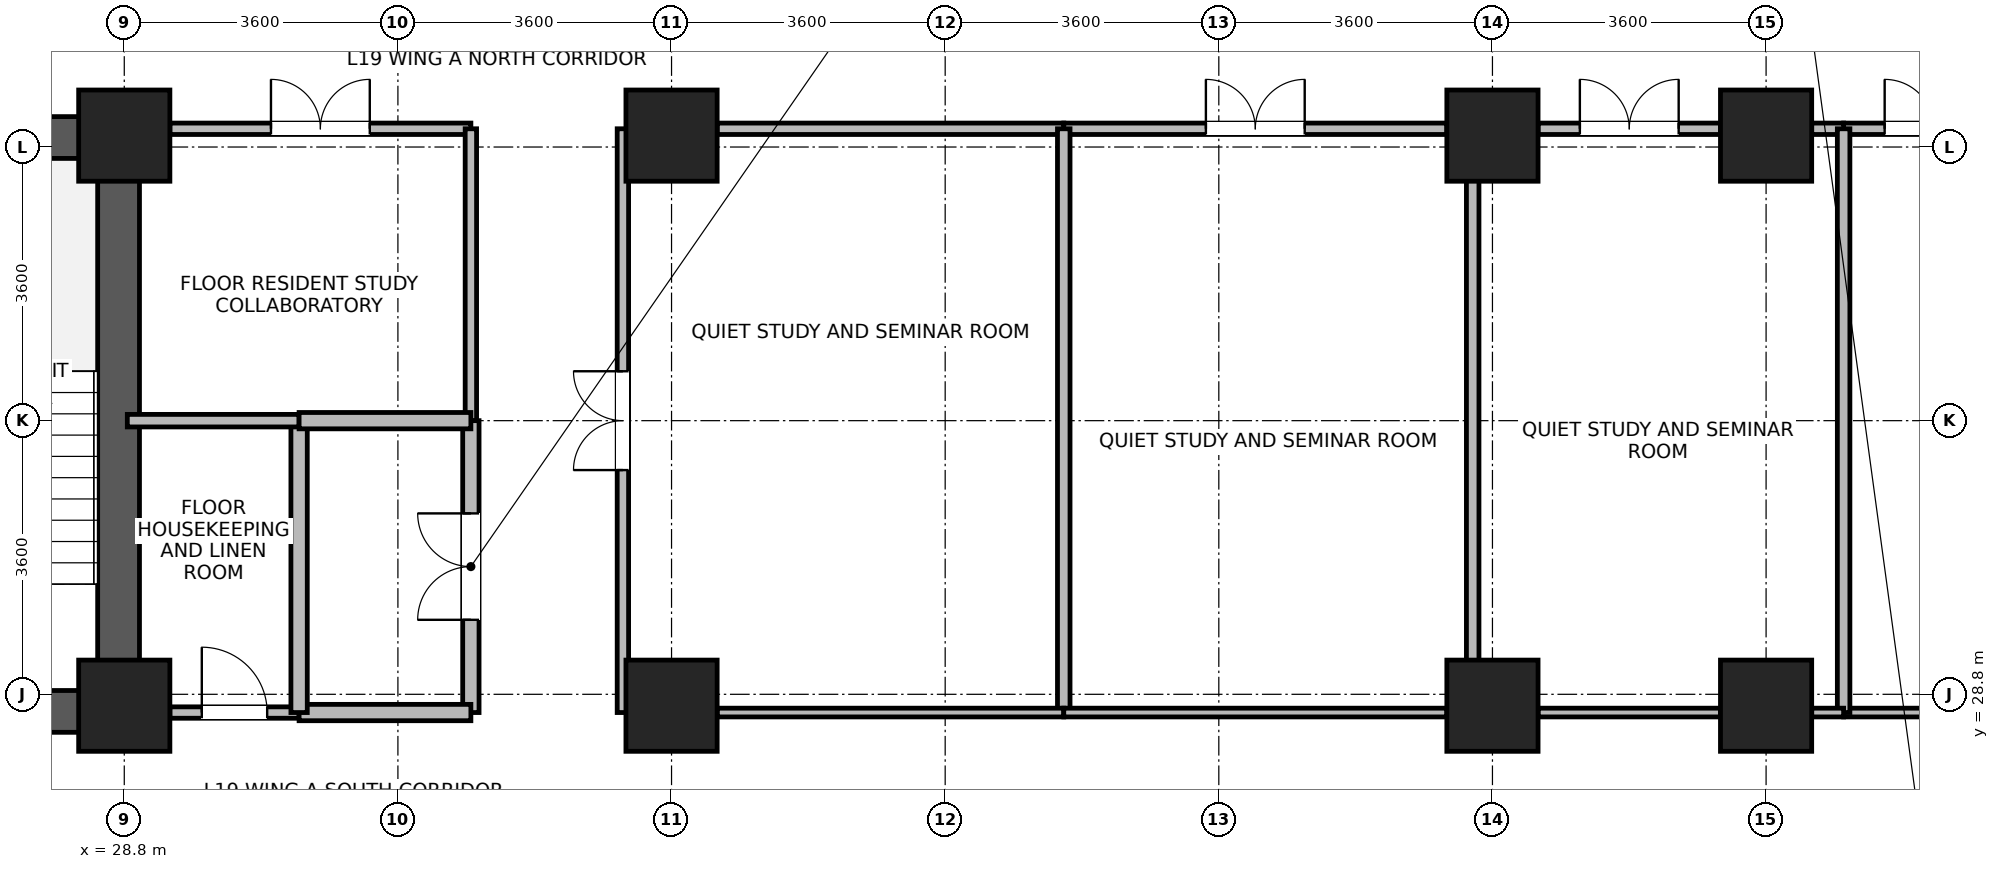
"""IFC4 building model, lengths in metres.
Left out: names, types, materials, properties, quantities, classifications, styles, units other than length and angle.
Written with IfcOpenShell. Run it as: python <this file> out.ifc"""

import sys

from ifc_helpers import new_model, si_unit, direction, frame, frame_2d, origin, origin_2d, place, context, subcontext, project, spatial, rectangle, extrude, source, transform, mapped, element, fill, save


model = new_model("IFC4")
c1 = context("Model", 3, precision=1e-05, world=origin(), true_north=direction((0.0, 1.0)))
c2 = subcontext(c1, "Body", "Model", "MODEL_VIEW")
j1 = project(units=[si_unit("LENGTHUNIT", "METRE"), si_unit("PLANEANGLEUNIT", "RADIAN")], contexts=[c1])
p1 = place(None, origin())
s1 = spatial("IfcSite", under=j1, at=p1, CompositionType="ELEMENT")
p2 = place(p1, origin())
s2 = spatial("IfcBuilding", under=s1, at=p2, CompositionType="ELEMENT")
p3 = place(p2, frame((0.0, 0.0, 78.6)))
s3 = spatial("IfcBuildingStorey", under=s2, at=p3, CompositionType="ELEMENT", Elevation=78.6)
p4 = place(p3, frame((28.725, 28.3, 0.0), z_axis=(0.0, 0.0, 1.0), x_axis=(0.0, 1.0, 0.0)))
e1 = element("IfcWall", 1, at=p4, inside=s3, PredefinedType="SHEAR", context=c2, shape_type="SweptSolid", body=[
    extrude(rectangle(XDim=8.1, YDim=0.55, at=frame_2d((4.05, 0.0))), origin(), (0.0, 0.0, 1.0), 3.45),
])
for number, where, z_axis, x_axis in (
    (2, (25.25, 28.575, 0.0), (0.0, 0.0, 1.0), (1.0, 0.0, 0.0)),
    (3, (25.25, 36.125, 0.0), (0.0, 0.0, 1.0), (1.0, 0.0, 0.0)),
):
    element("IfcWall", number, at=place(p3, frame(where, z_axis=z_axis, x_axis=x_axis)), inside=s3, PredefinedType="SHEAR", context=c2, shape_type="SweptSolid", body=[
        extrude(rectangle(XDim=3.2, YDim=0.55, at=frame_2d((1.6, 0.0))), origin(), (0.0, 0.0, 1.0), 3.45),
    ])
m1 = source(origin(), c2, "Body", "SweptSolid", [
    extrude(rectangle(XDim=1.2, YDim=1.2, at=origin_2d()), origin(), (0.0, 0.0, 1.0), 3.7),
])
for number, where, z_axis, x_axis in (
    (4, (28.8, 28.65, 0.0), (0.0, 0.0, 1.0), (1.0, 0.0, 0.0)),
    (5, (28.8, 36.15, 0.0), (0.0, 0.0, 1.0), (1.0, 0.0, 0.0)),
    (6, (36.0, 28.65, 0.0), (0.0, 0.0, 1.0), (1.0, 0.0, 0.0)),
    (7, (36.0, 36.15, 0.0), (0.0, 0.0, 1.0), (1.0, 0.0, 0.0)),
    (8, (46.8, 28.65, 0.0), (0.0, 0.0, 1.0), (1.0, 0.0, 0.0)),
    (9, (46.8, 36.15, 0.0), (0.0, 0.0, 1.0), (1.0, 0.0, 0.0)),
    (10, (50.4, 28.65, 0.0), (0.0, 0.0, 1.0), (1.0, 0.0, 0.0)),
    (11, (50.4, 36.15, 0.0), (0.0, 0.0, 1.0), (1.0, 0.0, 0.0)),
):
    element("IfcColumn", number, at=place(p3, frame(where, z_axis=z_axis, x_axis=x_axis)), inside=s3, PredefinedType="COLUMN", context=c2, shape_type="MappedRepresentation", body=[
        mapped(m1, transform((0.0, 0.0, 0.0), x_axis=(1.0, 0.0, 0.0), y_axis=(0.0, 1.0, 0.0), z_axis=(0.0, 0.0, 1.0), scale=1.0)),
    ])
p5 = place(p3, frame((51.42, 36.24, 0.0), z_axis=(0.0, 0.0, 1.0), x_axis=(1.0, 0.0, 0.0)))
e12 = element("IfcWall", 12, at=p5, inside=s3, PredefinedType="PARTITIONING", context=c2, shape_type="SweptSolid", body=[
    extrude(rectangle(XDim=2.38, YDim=0.15, at=frame_2d((1.19, 0.0))), origin(), (0.0, 0.0, 1.0), 2.78),
])
p6 = place(p5, frame((0.54, 0.0, 0.0)))
e13 = element("IfcOpeningElement", 13, at=p6, cuts=e12, PredefinedType="OPENING", context=c2, shape_type="SweptSolid", body=[
    extrude(rectangle(XDim=1.3, YDim=2.12, at=frame_2d((0.65, 1.06))), frame((0.0, 0.085, 0.0), z_axis=(0.0, -1.0, 0.0), x_axis=(1.0, 0.0, 0.0)), (0.0, 0.0, 1.0), 0.17),
])
p7 = place(p3, frame((35.36, 28.56, 0.0), z_axis=(0.0, 0.0, 1.0), x_axis=(0.0, 1.0, 0.0)))
e14 = element("IfcWall", 14, at=p7, inside=s3, PredefinedType="PARTITIONING", context=c2, shape_type="SweptSolid", body=[
    extrude(rectangle(XDim=7.68, YDim=0.15, at=frame_2d((3.84, 0.0))), origin(), (0.0, 0.0, 1.0), 3.43),
])
p8 = place(p7, frame((3.19, 0.0, 0.0)))
e15 = element("IfcOpeningElement", 15, at=p8, cuts=e14, PredefinedType="OPENING", context=c2, shape_type="SweptSolid", body=[
    extrude(rectangle(XDim=1.3, YDim=2.12, at=frame_2d((0.65, 1.06))), frame((0.0, 0.085, 0.0), z_axis=(0.0, -1.0, 0.0), x_axis=(1.0, 0.0, 0.0)), (0.0, 0.0, 1.0), 0.17),
])
p9 = place(p3, frame((36.6, 36.24, 0.0), z_axis=(0.0, 0.0, 1.0), x_axis=(1.0, 0.0, 0.0)))
e16 = element("IfcWall", 16, at=p9, inside=s3, PredefinedType="PARTITIONING", context=c2, shape_type="SweptSolid", body=[
    extrude(rectangle(XDim=4.56, YDim=0.15, at=frame_2d((2.28, 0.0))), origin(), (0.0, 0.0, 1.0), 2.78),
])
p10 = place(p3, frame((41.16, 36.24, 0.0), z_axis=(0.0, 0.0, 1.0), x_axis=(1.0, 0.0, 0.0)))
e17 = element("IfcWall", 17, at=p10, inside=s3, PredefinedType="PARTITIONING", context=c2, shape_type="SweptSolid", body=[
    extrude(rectangle(XDim=5.04, YDim=0.15, at=frame_2d((2.52, 0.0))), origin(), (0.0, 0.0, 1.0), 2.78),
])
p11 = place(p10, frame((1.87, 0.0, 0.0)))
e18 = element("IfcOpeningElement", 18, at=p11, cuts=e17, PredefinedType="OPENING", context=c2, shape_type="SweptSolid", body=[
    extrude(rectangle(XDim=1.3, YDim=2.12, at=frame_2d((0.65, 1.06))), frame((0.0, 0.085, 0.0), z_axis=(0.0, -1.0, 0.0), x_axis=(1.0, 0.0, 0.0)), (0.0, 0.0, 1.0), 0.17),
])
p12 = place(p3, frame((47.4, 36.24, 0.0), z_axis=(0.0, 0.0, 1.0), x_axis=(1.0, 0.0, 0.0)))
e19 = element("IfcWall", 19, at=p12, inside=s3, PredefinedType="PARTITIONING", context=c2, shape_type="SweptSolid", body=[
    extrude(rectangle(XDim=2.4, YDim=0.15, at=frame_2d((1.2, 0.0))), origin(), (0.0, 0.0, 1.0), 2.78),
])
p13 = place(p12, frame((0.55, 0.0, 0.0)))
e20 = element("IfcOpeningElement", 20, at=p13, cuts=e19, PredefinedType="OPENING", context=c2, shape_type="SweptSolid", body=[
    extrude(rectangle(XDim=1.3, YDim=2.12, at=frame_2d((0.65, 1.06))), frame((0.0, 0.085, 0.0), z_axis=(0.0, -1.0, 0.0), x_axis=(1.0, 0.0, 0.0)), (0.0, 0.0, 1.0), 0.17),
])
p14 = place(p3, frame((51.0, 36.24, 0.0), z_axis=(0.0, 0.0, 1.0), x_axis=(1.0, 0.0, 0.0)))
e21 = element("IfcWall", 21, at=p14, inside=s3, PredefinedType="PARTITIONING", context=c2, shape_type="SweptSolid", body=[
    extrude(rectangle(XDim=0.42, YDim=0.15, at=frame_2d((0.21, 0.0))), origin(), (0.0, 0.0, 1.0), 2.78),
])
p15 = place(p3, frame((29.4, 36.24, 0.0), z_axis=(0.0, 0.0, 1.0), x_axis=(1.0, 0.0, 0.0)))
e22 = element("IfcWall", 22, at=p15, inside=s3, PredefinedType="PARTITIONING", context=c2, shape_type="SweptSolid", body=[
    extrude(rectangle(XDim=3.96, YDim=0.15, at=frame_2d((1.98, 0.0))), origin(), (0.0, 0.0, 1.0), 2.78),
])
p16 = place(p15, frame((1.33, 0.0, 0.0)))
e23 = element("IfcOpeningElement", 23, at=p16, cuts=e22, PredefinedType="OPENING", context=c2, shape_type="SweptSolid", body=[
    extrude(rectangle(XDim=1.3, YDim=2.12, at=frame_2d((0.65, 1.06))), frame((0.0, 0.085, 0.0), z_axis=(0.0, -1.0, 0.0), x_axis=(1.0, 0.0, 0.0)), (0.0, 0.0, 1.0), 0.17),
])
p17 = place(p3, frame((33.36, 32.4, 0.0), z_axis=(0.0, 0.0, 1.0), x_axis=(0.0, 1.0, 0.0)))
e24 = element("IfcWall", 24, at=p17, inside=s3, PredefinedType="PARTITIONING", context=c2, shape_type="SweptSolid", body=[
    extrude(rectangle(XDim=3.84, YDim=0.15, at=frame_2d((1.92, 0.0))), origin(), (0.0, 0.0, 1.0), 3.43),
])
p18 = place(p3, frame((33.36, 28.56, 0.0), z_axis=(0.0, 0.0, 1.0), x_axis=(0.0, 1.0, 0.0)))
e25 = element("IfcWall", 25, at=p18, inside=s3, PredefinedType="PARTITIONING", context=c2, shape_type="SweptSolid", body=[
    extrude(rectangle(XDim=3.84, YDim=0.215, at=frame_2d((1.92, 0.0))), origin(), (0.0, 0.0, 1.0), 3.43),
])
p19 = place(p18, frame((1.22, 0.0, 0.0)))
e26 = element("IfcOpeningElement", 26, at=p19, cuts=e25, PredefinedType="OPENING", context=c2, shape_type="SweptSolid", body=[
    extrude(rectangle(XDim=1.4, YDim=2.15, at=frame_2d((0.7, 1.075))), frame((0.0, 0.118, 0.0), z_axis=(0.0, -1.0, 0.0), x_axis=(1.0, 0.0, 0.0)), (0.0, 0.0, 1.0), 0.235),
])
p20 = place(p3, frame((29.4, 28.56, 0.0), z_axis=(0.0, 0.0, 1.0), x_axis=(1.0, 0.0, 0.0)))
e27 = element("IfcWall", 27, at=p20, inside=s3, PredefinedType="PARTITIONING", context=c2, shape_type="SweptSolid", body=[
    extrude(rectangle(XDim=1.7, YDim=0.15, at=frame_2d((0.85, 0.0))), origin(), (0.0, 0.0, 1.0), 2.78),
])
p21 = place(p20, frame((0.42, 0.0, 0.0)))
e28 = element("IfcOpeningElement", 28, at=p21, cuts=e27, PredefinedType="OPENING", context=c2, shape_type="SweptSolid", body=[
    extrude(rectangle(XDim=0.86, YDim=2.02, at=frame_2d((0.43, 1.01))), frame((0.0, 0.085, 0.0), z_axis=(0.0, -1.0, 0.0), x_axis=(1.0, 0.0, 0.0)), (0.0, 0.0, 1.0), 0.17),
])
p22 = place(p3, frame((31.1, 28.56, 0.0), z_axis=(0.0, 0.0, 1.0), x_axis=(1.0, 0.0, 0.0)))
e29 = element("IfcWall", 29, at=p22, inside=s3, PredefinedType="PARTITIONING", context=c2, shape_type="SweptSolid", body=[
    extrude(rectangle(XDim=2.26, YDim=0.215, at=frame_2d((1.13, 0.0))), origin(), (0.0, 0.0, 1.0), 2.78),
])
p23 = place(p3, frame((51.42, 28.56, 0.0), z_axis=(0.0, 0.0, 1.0), x_axis=(1.0, 0.0, 0.0)))
e30 = element("IfcWall", 30, at=p23, inside=s3, PredefinedType="PARTITIONING", context=c2, shape_type="SweptSolid", body=[
    extrude(rectangle(XDim=2.38, YDim=0.115, at=frame_2d((1.19, 0.0))), origin(), (0.0, 0.0, 1.0), 2.78),
])
for number, where, z_axis, x_axis in (
    (31, (41.16, 28.56, 0.0), (0.0, 0.0, 1.0), (0.0, 1.0, 0.0)),
    (32, (46.54, 28.56, 0.0), (0.0, 0.0, 1.0), (0.0, 1.0, 0.0)),
    (33, (51.42, 28.56, 0.0), (0.0, 0.0, 1.0), (0.0, 1.0, 0.0)),
):
    element("IfcWall", number, at=place(p3, frame(where, z_axis=z_axis, x_axis=x_axis)), inside=s3, PredefinedType="PARTITIONING", context=c2, shape_type="SweptSolid", body=[
        extrude(rectangle(XDim=7.68, YDim=0.165, at=frame_2d((3.84, 0.0))), origin(), (0.0, 0.0, 1.0), 3.43),
    ])
p24 = place(p3, frame((36.6, 28.56, 0.0), z_axis=(0.0, 0.0, 1.0), x_axis=(1.0, 0.0, 0.0)))
e34 = element("IfcWall", 34, at=p24, inside=s3, PredefinedType="PARTITIONING", context=c2, shape_type="SweptSolid", body=[
    extrude(rectangle(XDim=4.56, YDim=0.115, at=frame_2d((2.28, 0.0))), origin(), (0.0, 0.0, 1.0), 2.78),
])
p25 = place(p3, frame((41.16, 28.56, 0.0), z_axis=(0.0, 0.0, 1.0), x_axis=(1.0, 0.0, 0.0)))
e35 = element("IfcWall", 35, at=p25, inside=s3, PredefinedType="PARTITIONING", context=c2, shape_type="SweptSolid", body=[
    extrude(rectangle(XDim=5.04, YDim=0.115, at=frame_2d((2.52, 0.0))), origin(), (0.0, 0.0, 1.0), 2.78),
])
p26 = place(p3, frame((47.4, 28.56, 0.0), z_axis=(0.0, 0.0, 1.0), x_axis=(1.0, 0.0, 0.0)))
e36 = element("IfcWall", 36, at=p26, inside=s3, PredefinedType="PARTITIONING", context=c2, shape_type="SweptSolid", body=[
    extrude(rectangle(XDim=2.4, YDim=0.115, at=frame_2d((1.2, 0.0))), origin(), (0.0, 0.0, 1.0), 2.78),
])
p27 = place(p3, frame((51.0, 28.56, 0.0), z_axis=(0.0, 0.0, 1.0), x_axis=(1.0, 0.0, 0.0)))
e37 = element("IfcWall", 37, at=p27, inside=s3, PredefinedType="PARTITIONING", context=c2, shape_type="SweptSolid", body=[
    extrude(rectangle(XDim=0.42, YDim=0.115, at=frame_2d((0.21, 0.0))), origin(), (0.0, 0.0, 1.0), 2.78),
])
p28 = place(p3, frame((31.1, 28.56, 0.0), z_axis=(0.0, 0.0, 1.0), x_axis=(0.0, 1.0, 0.0)))
e38 = element("IfcWall", 38, at=p28, inside=s3, PredefinedType="PARTITIONING", context=c2, shape_type="SweptSolid", body=[
    extrude(rectangle(XDim=3.84, YDim=0.215, at=frame_2d((1.92, 0.0))), origin(), (0.0, 0.0, 1.0), 3.43),
])
p29 = place(p3, frame((28.84, 32.4, 0.0), z_axis=(0.0, 0.0, 1.0), x_axis=(1.0, 0.0, 0.0)))
e39 = element("IfcWall", 39, at=p29, inside=s3, PredefinedType="PARTITIONING", context=c2, shape_type="SweptSolid", body=[
    extrude(rectangle(XDim=2.26, YDim=0.165, at=frame_2d((1.13, 0.0))), origin(), (0.0, 0.0, 1.0), 3.43),
])
p30 = place(p3, frame((31.1, 32.4, 0.0), z_axis=(0.0, 0.0, 1.0), x_axis=(1.0, 0.0, 0.0)))
e40 = element("IfcWall", 40, at=p30, inside=s3, PredefinedType="PARTITIONING", context=c2, shape_type="SweptSolid", body=[
    extrude(rectangle(XDim=2.26, YDim=0.215, at=frame_2d((1.13, 0.0))), origin(), (0.0, 0.0, 1.0), 3.43),
])
p31 = place(p6, origin())
e41 = element("IfcDoor", 41, at=p31, inside=s3, OperationType="DOUBLE_DOOR_SINGLE_SWING", PredefinedType="DOOR", context=c2, shape_type="SweptSolid", body=[
    extrude(rectangle(XDim=1.3, YDim=2.12, at=frame_2d((0.65, 1.06))), frame((0.0, 0.025, 0.0), z_axis=(0.0, -1.0, 0.0), x_axis=(1.0, 0.0, 0.0)), (0.0, 0.0, 1.0), 0.05),
])
fill(e13, e41)
p32 = place(p8, origin())
e42 = element("IfcDoor", 42, at=p32, inside=s3, OperationType="DOUBLE_DOOR_SINGLE_SWING", PredefinedType="DOOR", context=c2, shape_type="SweptSolid", body=[
    extrude(rectangle(XDim=1.3, YDim=2.12, at=frame_2d((0.65, 1.06))), frame((0.0, 0.025, 0.0), z_axis=(0.0, -1.0, 0.0), x_axis=(1.0, 0.0, 0.0)), (0.0, 0.0, 1.0), 0.05),
])
fill(e15, e42)
p33 = place(p11, origin())
e43 = element("IfcDoor", 43, at=p33, inside=s3, OperationType="DOUBLE_DOOR_SINGLE_SWING", PredefinedType="DOOR", context=c2, shape_type="SweptSolid", body=[
    extrude(rectangle(XDim=1.3, YDim=2.12, at=frame_2d((0.65, 1.06))), frame((0.0, 0.025, 0.0), z_axis=(0.0, -1.0, 0.0), x_axis=(1.0, 0.0, 0.0)), (0.0, 0.0, 1.0), 0.05),
])
fill(e18, e43)
p34 = place(p13, origin())
e44 = element("IfcDoor", 44, at=p34, inside=s3, OperationType="DOUBLE_DOOR_SINGLE_SWING", PredefinedType="DOOR", context=c2, shape_type="SweptSolid", body=[
    extrude(rectangle(XDim=1.3, YDim=2.12, at=frame_2d((0.65, 1.06))), frame((0.0, 0.025, 0.0), z_axis=(0.0, -1.0, 0.0), x_axis=(1.0, 0.0, 0.0)), (0.0, 0.0, 1.0), 0.05),
])
fill(e20, e44)
p35 = place(p16, origin())
e45 = element("IfcDoor", 45, at=p35, inside=s3, OperationType="DOUBLE_DOOR_SINGLE_SWING", PredefinedType="DOOR", context=c2, shape_type="SweptSolid", body=[
    extrude(rectangle(XDim=1.3, YDim=2.12, at=frame_2d((0.65, 1.06))), frame((0.0, 0.025, 0.0), z_axis=(0.0, -1.0, 0.0), x_axis=(1.0, 0.0, 0.0)), (0.0, 0.0, 1.0), 0.05),
])
fill(e23, e45)
p36 = place(p19, origin())
e46 = element("IfcDoor", 46, at=p36, inside=s3, OperationType="DOUBLE_DOOR_SINGLE_SWING", PredefinedType="DOOR", context=c2, shape_type="SweptSolid", body=[
    extrude(rectangle(XDim=1.4, YDim=2.15, at=frame_2d((0.7, 1.075))), frame((0.0, 0.025, 0.0), z_axis=(0.0, -1.0, 0.0), x_axis=(1.0, 0.0, 0.0)), (0.0, 0.0, 1.0), 0.05),
])
fill(e26, e46)
p37 = place(p21, origin())
e47 = element("IfcDoor", 47, at=p37, inside=s3, OperationType="SINGLE_SWING_LEFT", PredefinedType="DOOR", context=c2, shape_type="SweptSolid", body=[
    extrude(rectangle(XDim=0.86, YDim=2.02, at=frame_2d((0.43, 1.01))), frame((0.0, 0.025, 0.0), z_axis=(0.0, -1.0, 0.0), x_axis=(1.0, 0.0, 0.0)), (0.0, 0.0, 1.0), 0.05),
])
fill(e28, e47)
save(model, sys.argv[1])
